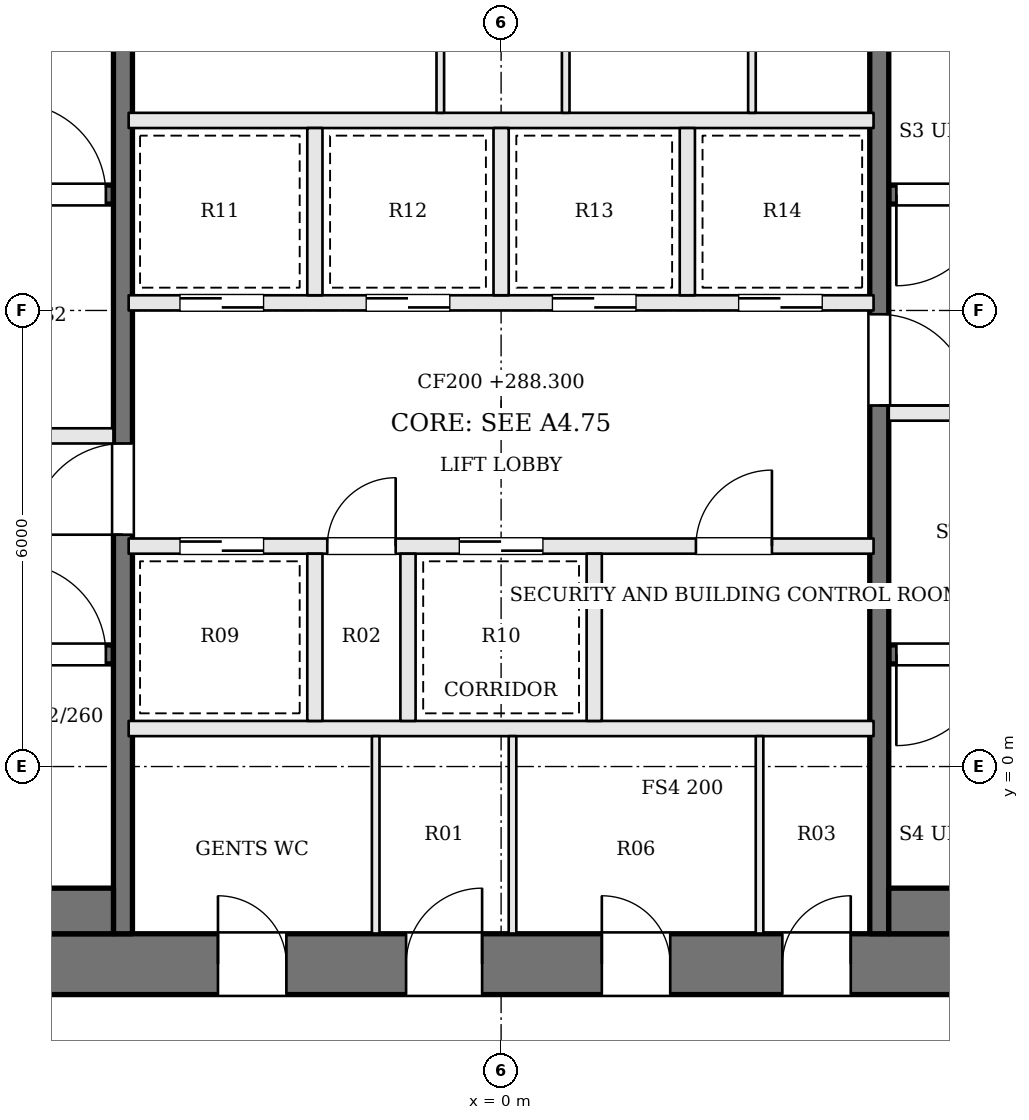
"""IFC4 building model, lengths in metres.
Left out: names, types, materials, properties, quantities, classifications, styles, units other than length and angle.
Written with IfcOpenShell. Run it as: python <this file> out.ifc"""

import sys

from ifc_helpers import new_model, si_unit, direction, frame, frame_2d, origin, place, context, subcontext, project, spatial, rectangle, extrude, element, fill, save


model = new_model("IFC4")
c1 = context("Model", 3, precision=1e-05, world=origin(), true_north=direction((0.0, 1.0)))
c2 = subcontext(c1, "Body", "Model", "MODEL_VIEW")
j1 = project(units=[si_unit("LENGTHUNIT", "METRE"), si_unit("PLANEANGLEUNIT", "RADIAN")], contexts=[c1])
p1 = place(None, origin())
s1 = spatial("IfcSite", under=j1, at=p1, CompositionType="ELEMENT")
p2 = place(p1, origin())
s2 = spatial("IfcBuilding", under=s1, at=p2, CompositionType="ELEMENT")
p3 = place(p2, frame((0.0, 0.0, 288.3)))
s3 = spatial("IfcBuildingStorey", under=s2, at=p3, CompositionType="ELEMENT", Elevation=288.3)
p4 = place(p3, frame((-13.0, -2.6, 0.0), z_axis=(0.0, 0.0, 1.0), x_axis=(1.0, 0.0, 0.0)))
e1 = element("IfcWall", 1, at=p4, inside=s3, PredefinedType="SHEAR", context=c2, shape_type="SweptSolid", body=[
    extrude(rectangle(XDim=26.0, YDim=0.8, at=frame_2d((13.0, 0.0))), origin(), (0.0, 0.0, 1.0), 3.9),
])
p5 = place(p4, frame((9.275, 0.0, 0.0)))
e2 = element("IfcOpeningElement", 2, at=p5, cuts=e1, PredefinedType="OPENING", context=c2, shape_type="SweptSolid", body=[
    extrude(rectangle(XDim=0.9, YDim=2.1, at=frame_2d((0.45, 1.05))), frame((0.0, 0.41, 0.0), z_axis=(0.0, -1.0, 0.0), x_axis=(1.0, 0.0, 0.0)), (0.0, 0.0, 1.0), 0.82),
])
p6 = place(p4, frame((11.75, 0.0, 0.0)))
e3 = element("IfcOpeningElement", 3, at=p6, cuts=e1, PredefinedType="OPENING", context=c2, shape_type="SweptSolid", body=[
    extrude(rectangle(XDim=1.0, YDim=2.1, at=frame_2d((0.5, 1.05))), frame((0.0, 0.41, 0.0), z_axis=(0.0, -1.0, 0.0), x_axis=(1.0, 0.0, 0.0)), (0.0, 0.0, 1.0), 0.82),
])
p7 = place(p4, frame((14.325, 0.0, 0.0)))
e4 = element("IfcOpeningElement", 4, at=p7, cuts=e1, PredefinedType="OPENING", context=c2, shape_type="SweptSolid", body=[
    extrude(rectangle(XDim=0.9, YDim=2.1, at=frame_2d((0.45, 1.05))), frame((0.0, 0.41, 0.0), z_axis=(0.0, -1.0, 0.0), x_axis=(1.0, 0.0, 0.0)), (0.0, 0.0, 1.0), 0.82),
])
p8 = place(p4, frame((16.7, 0.0, 0.0)))
e5 = element("IfcOpeningElement", 5, at=p8, cuts=e1, PredefinedType="OPENING", context=c2, shape_type="SweptSolid", body=[
    extrude(rectangle(XDim=0.9, YDim=2.1, at=frame_2d((0.45, 1.05))), frame((0.0, 0.41, 0.0), z_axis=(0.0, -1.0, 0.0), x_axis=(1.0, 0.0, 0.0)), (0.0, 0.0, 1.0), 0.82),
])
p9 = place(p3, frame((-12.2, 1.475, 0.0), z_axis=(0.0, 0.0, 1.0), x_axis=(1.0, 0.0, 0.0)))
e6 = element("IfcWall", 6, at=p9, inside=s3, PredefinedType="SOLIDWALL", context=c2, shape_type="SweptSolid", body=[
    extrude(rectangle(XDim=7.1, YDim=0.25, at=frame_2d((3.55, 0.0))), origin(), (0.0, 0.0, 1.0), 3.7),
])
p10 = place(p9, frame((5.8, 0.0, 0.0)))
e7 = element("IfcOpeningElement", 7, at=p10, cuts=e6, PredefinedType="OPENING", context=c2, shape_type="SweptSolid", body=[
    extrude(rectangle(XDim=1.2, YDim=2.1, at=frame_2d((0.6, 1.05))), frame((0.0, 0.135, 0.0), z_axis=(0.0, -1.0, 0.0), x_axis=(1.0, 0.0, 0.0)), (0.0, 0.0, 1.0), 0.27),
])
p11 = place(p3, frame((12.2, 7.525, 0.0), z_axis=(0.0, 0.0, 1.0), x_axis=(-1.0, 0.0, 0.0)))
e8 = element("IfcWall", 8, at=p11, inside=s3, PredefinedType="SOLIDWALL", context=c2, shape_type="SweptSolid", body=[
    extrude(rectangle(XDim=7.1, YDim=0.25, at=frame_2d((3.55, 0.0))), origin(), (0.0, 0.0, 1.0), 3.7),
])
p12 = place(p11, frame((5.8, 0.0, 0.0)))
e9 = element("IfcOpeningElement", 9, at=p12, cuts=e8, PredefinedType="OPENING", context=c2, shape_type="SweptSolid", body=[
    extrude(rectangle(XDim=1.2, YDim=2.1, at=frame_2d((0.6, 1.05))), frame((0.0, 0.135, 0.0), z_axis=(0.0, -1.0, 0.0), x_axis=(1.0, 0.0, 0.0)), (0.0, 0.0, 1.0), 0.27),
])
p13 = place(p3, frame((-12.2, 4.35, 0.0), z_axis=(0.0, 0.0, 1.0), x_axis=(1.0, 0.0, 0.0)))
e10 = element("IfcWall", 10, at=p13, inside=s3, PredefinedType="SOLIDWALL", context=c2, shape_type="SweptSolid", body=[
    extrude(rectangle(XDim=7.1, YDim=0.2, at=frame_2d((3.55, 0.0))), origin(), (0.0, 0.0, 1.0), 3.7),
])
p14 = place(p13, frame((4.4, 0.0, 0.0)))
e11 = element("IfcOpeningElement", 11, at=p14, cuts=e10, PredefinedType="OPENING", context=c2, shape_type="SweptSolid", body=[
    extrude(rectangle(XDim=1.2, YDim=2.1, at=frame_2d((0.6, 1.05))), frame((0.0, 0.11, 0.0), z_axis=(0.0, -1.0, 0.0), x_axis=(1.0, 0.0, 0.0)), (0.0, 0.0, 1.0), 0.22),
])
p15 = place(p13, frame((1.1, 0.0, 0.0)))
e12 = element("IfcOpeningElement", 12, at=p15, cuts=e10, PredefinedType="OPENING", context=c2, shape_type="SweptSolid", body=[
    extrude(rectangle(XDim=1.2, YDim=2.1, at=frame_2d((0.6, 1.05))), frame((0.0, 0.11, 0.0), z_axis=(0.0, -1.0, 0.0), x_axis=(1.0, 0.0, 0.0)), (0.0, 0.0, 1.0), 0.22),
])
p16 = place(p3, frame((12.2, 4.65, 0.0), z_axis=(0.0, 0.0, 1.0), x_axis=(-1.0, 0.0, 0.0)))
e13 = element("IfcWall", 13, at=p16, inside=s3, PredefinedType="SOLIDWALL", context=c2, shape_type="SweptSolid", body=[
    extrude(rectangle(XDim=7.1, YDim=0.2, at=frame_2d((3.55, 0.0))), origin(), (0.0, 0.0, 1.0), 3.7),
])
p17 = place(p16, frame((4.4, 0.0, 0.0)))
e14 = element("IfcOpeningElement", 14, at=p17, cuts=e13, PredefinedType="OPENING", context=c2, shape_type="SweptSolid", body=[
    extrude(rectangle(XDim=1.2, YDim=2.1, at=frame_2d((0.6, 1.05))), frame((0.0, 0.11, 0.0), z_axis=(0.0, -1.0, 0.0), x_axis=(1.0, 0.0, 0.0)), (0.0, 0.0, 1.0), 0.22),
])
p18 = place(p16, frame((1.1, 0.0, 0.0)))
e15 = element("IfcOpeningElement", 15, at=p18, cuts=e13, PredefinedType="OPENING", context=c2, shape_type="SweptSolid", body=[
    extrude(rectangle(XDim=1.2, YDim=2.1, at=frame_2d((0.6, 1.05))), frame((0.0, 0.11, 0.0), z_axis=(0.0, -1.0, 0.0), x_axis=(1.0, 0.0, 0.0)), (0.0, 0.0, 1.0), 0.22),
])
p19 = place(p3, frame((-12.2, 7.525, 0.0), z_axis=(0.0, 0.0, 1.0), x_axis=(1.0, 0.0, 0.0)))
e16 = element("IfcWall", 16, at=p19, inside=s3, PredefinedType="SOLIDWALL", context=c2, shape_type="SweptSolid", body=[
    extrude(rectangle(XDim=7.1, YDim=0.25, at=frame_2d((3.55, 0.0))), origin(), (0.0, 0.0, 1.0), 3.7),
])
p20 = place(p19, frame((5.8, 0.0, 0.0)))
e17 = element("IfcOpeningElement", 17, at=p20, cuts=e16, PredefinedType="OPENING", context=c2, shape_type="SweptSolid", body=[
    extrude(rectangle(XDim=1.2, YDim=2.1, at=frame_2d((0.6, 1.05))), frame((0.0, 0.135, 0.0), z_axis=(0.0, -1.0, 0.0), x_axis=(1.0, 0.0, 0.0)), (0.0, 0.0, 1.0), 0.27),
])
p21 = place(p3, frame((12.2, 1.475, 0.0), z_axis=(0.0, 0.0, 1.0), x_axis=(-1.0, 0.0, 0.0)))
e18 = element("IfcWall", 18, at=p21, inside=s3, PredefinedType="SOLIDWALL", context=c2, shape_type="SweptSolid", body=[
    extrude(rectangle(XDim=7.1, YDim=0.25, at=frame_2d((3.55, 0.0))), origin(), (0.0, 0.0, 1.0), 3.7),
])
p22 = place(p21, frame((5.8, 0.0, 0.0)))
e19 = element("IfcOpeningElement", 19, at=p22, cuts=e18, PredefinedType="OPENING", context=c2, shape_type="SweptSolid", body=[
    extrude(rectangle(XDim=1.2, YDim=2.1, at=frame_2d((0.6, 1.05))), frame((0.0, 0.135, 0.0), z_axis=(0.0, -1.0, 0.0), x_axis=(1.0, 0.0, 0.0)), (0.0, 0.0, 1.0), 0.27),
])
p23 = place(p3, frame((-4.975, -2.2, 0.0), z_axis=(0.0, 0.0, 1.0), x_axis=(0.0, 1.0, 0.0)))
e20 = element("IfcWall", 20, at=p23, inside=s3, PredefinedType="SOLIDWALL", context=c2, shape_type="SweptSolid", body=[
    extrude(rectangle(XDim=13.4, YDim=0.25, at=frame_2d((6.7, 0.0))), origin(), (0.0, 0.0, 1.0), 3.7),
])
p24 = place(p23, frame((5.25, 0.0, 0.0)))
e21 = element("IfcOpeningElement", 21, at=p24, cuts=e20, PredefinedType="OPENING", context=c2, shape_type="SweptSolid", body=[
    extrude(rectangle(XDim=1.2, YDim=2.1, at=frame_2d((0.6, 1.05))), frame((0.0, 0.135, 0.0), z_axis=(0.0, -1.0, 0.0), x_axis=(1.0, 0.0, 0.0)), (0.0, 0.0, 1.0), 0.27),
])
p25 = place(p3, frame((4.975, 11.2, 0.0), z_axis=(0.0, 0.0, 1.0), x_axis=(0.0, -1.0, 0.0)))
e22 = element("IfcWall", 22, at=p25, inside=s3, PredefinedType="SOLIDWALL", context=c2, shape_type="SweptSolid", body=[
    extrude(rectangle(XDim=13.4, YDim=0.25, at=frame_2d((6.7, 0.0))), origin(), (0.0, 0.0, 1.0), 3.7),
])
p26 = place(p25, frame((5.25, 0.0, 0.0)))
e23 = element("IfcOpeningElement", 23, at=p26, cuts=e22, PredefinedType="OPENING", context=c2, shape_type="SweptSolid", body=[
    extrude(rectangle(XDim=1.2, YDim=2.1, at=frame_2d((0.6, 1.05))), frame((0.0, 0.135, 0.0), z_axis=(0.0, -1.0, 0.0), x_axis=(1.0, 0.0, 0.0)), (0.0, 0.0, 1.0), 0.27),
])
for number, where, z_axis, x_axis in (
    (24, (-12.2, -1.9, 0.0), (0.0, 0.0, 1.0), (1.0, 0.0, 0.0)),
    (25, (12.2, -1.9, 0.0), (0.0, 0.0, 1.0), (-1.0, 0.0, 0.0)),
):
    element("IfcWall", number, at=place(p3, frame(where, z_axis=z_axis, x_axis=x_axis)), inside=s3, PredefinedType="SOLIDWALL", context=c2, shape_type="SweptSolid", body=[
        extrude(rectangle(XDim=7.1, YDim=0.6, at=frame_2d((3.55, 0.0))), origin(), (0.0, 0.0, 1.0), 3.7),
    ])
p27 = place(p3, frame((-4.9, 0.5, 0.0), z_axis=(0.0, 0.0, 1.0), x_axis=(1.0, 0.0, 0.0)))
e26 = element("IfcWall", 26, at=p27, inside=s3, PredefinedType="SOLIDWALL", context=c2, shape_type="SweptSolid", body=[
    extrude(rectangle(XDim=9.8, YDim=0.2, at=frame_2d((4.9, 0.0))), origin(), (0.0, 0.0, 1.0), 3.7),
])
p28 = place(p3, frame((-4.9, 2.9, 0.0), z_axis=(0.0, 0.0, 1.0), x_axis=(1.0, 0.0, 0.0)))
e27 = element("IfcWall", 27, at=p28, inside=s3, PredefinedType="SOLIDWALL", context=c2, shape_type="SweptSolid", body=[
    extrude(rectangle(XDim=9.8, YDim=0.2, at=frame_2d((4.9, 0.0))), origin(), (0.0, 0.0, 1.0), 3.7),
])
p29 = place(p28, frame((0.675, 0.0, 0.0)))
e28 = element("IfcOpeningElement", 28, at=p29, cuts=e27, PredefinedType="OPENING", context=c2, shape_type="SweptSolid", body=[
    extrude(rectangle(XDim=1.1, YDim=2.1, at=frame_2d((0.55, 1.05))), frame((0.0, 0.11, 0.0), z_axis=(0.0, -1.0, 0.0), x_axis=(1.0, 0.0, 0.0)), (0.0, 0.0, 1.0), 0.22),
])
p30 = place(p28, frame((2.613, 0.0, 0.0)))
e29 = element("IfcOpeningElement", 29, at=p30, cuts=e27, PredefinedType="OPENING", context=c2, shape_type="SweptSolid", body=[
    extrude(rectangle(XDim=0.9, YDim=2.1, at=frame_2d((0.45, 1.05))), frame((0.0, 0.11, 0.0), z_axis=(0.0, -1.0, 0.0), x_axis=(1.0, 0.0, 0.0)), (0.0, 0.0, 1.0), 0.22),
])
p31 = place(p28, frame((4.35, 0.0, 0.0)))
e30 = element("IfcOpeningElement", 30, at=p31, cuts=e27, PredefinedType="OPENING", context=c2, shape_type="SweptSolid", body=[
    extrude(rectangle(XDim=1.1, YDim=2.1, at=frame_2d((0.55, 1.05))), frame((0.0, 0.11, 0.0), z_axis=(0.0, -1.0, 0.0), x_axis=(1.0, 0.0, 0.0)), (0.0, 0.0, 1.0), 0.22),
])
p32 = place(p28, frame((7.463, 0.0, 0.0)))
e31 = element("IfcOpeningElement", 31, at=p32, cuts=e27, PredefinedType="OPENING", context=c2, shape_type="SweptSolid", body=[
    extrude(rectangle(XDim=1.0, YDim=2.1, at=frame_2d((0.5, 1.05))), frame((0.0, 0.11, 0.0), z_axis=(0.0, -1.0, 0.0), x_axis=(1.0, 0.0, 0.0)), (0.0, 0.0, 1.0), 0.22),
])
p33 = place(p3, frame((-4.9, 6.1, 0.0), z_axis=(0.0, 0.0, 1.0), x_axis=(1.0, 0.0, 0.0)))
e32 = element("IfcWall", 32, at=p33, inside=s3, PredefinedType="SOLIDWALL", context=c2, shape_type="SweptSolid", body=[
    extrude(rectangle(XDim=9.8, YDim=0.2, at=frame_2d((4.9, 0.0))), origin(), (0.0, 0.0, 1.0), 3.7),
])
p34 = place(p33, frame((0.675, 0.0, 0.0)))
e33 = element("IfcOpeningElement", 33, at=p34, cuts=e32, PredefinedType="OPENING", context=c2, shape_type="SweptSolid", body=[
    extrude(rectangle(XDim=1.1, YDim=2.1, at=frame_2d((0.55, 1.05))), frame((0.0, 0.11, 0.0), z_axis=(0.0, -1.0, 0.0), x_axis=(1.0, 0.0, 0.0)), (0.0, 0.0, 1.0), 0.22),
])
p35 = place(p33, frame((3.125, 0.0, 0.0)))
e34 = element("IfcOpeningElement", 34, at=p35, cuts=e32, PredefinedType="OPENING", context=c2, shape_type="SweptSolid", body=[
    extrude(rectangle(XDim=1.1, YDim=2.1, at=frame_2d((0.55, 1.05))), frame((0.0, 0.11, 0.0), z_axis=(0.0, -1.0, 0.0), x_axis=(1.0, 0.0, 0.0)), (0.0, 0.0, 1.0), 0.22),
])
p36 = place(p33, frame((5.575, 0.0, 0.0)))
e35 = element("IfcOpeningElement", 35, at=p36, cuts=e32, PredefinedType="OPENING", context=c2, shape_type="SweptSolid", body=[
    extrude(rectangle(XDim=1.1, YDim=2.1, at=frame_2d((0.55, 1.05))), frame((0.0, 0.11, 0.0), z_axis=(0.0, -1.0, 0.0), x_axis=(1.0, 0.0, 0.0)), (0.0, 0.0, 1.0), 0.22),
])
p37 = place(p33, frame((8.025, 0.0, 0.0)))
e36 = element("IfcOpeningElement", 36, at=p37, cuts=e32, PredefinedType="OPENING", context=c2, shape_type="SweptSolid", body=[
    extrude(rectangle(XDim=1.1, YDim=2.1, at=frame_2d((0.55, 1.05))), frame((0.0, 0.11, 0.0), z_axis=(0.0, -1.0, 0.0), x_axis=(1.0, 0.0, 0.0)), (0.0, 0.0, 1.0), 0.22),
])
p38 = place(p3, frame((-4.9, 8.5, 0.0), z_axis=(0.0, 0.0, 1.0), x_axis=(1.0, 0.0, 0.0)))
e37 = element("IfcWall", 37, at=p38, inside=s3, PredefinedType="SOLIDWALL", context=c2, shape_type="SweptSolid", body=[
    extrude(rectangle(XDim=9.8, YDim=0.2, at=frame_2d((4.9, 0.0))), origin(), (0.0, 0.0, 1.0), 3.7),
])
for number, where, z_axis, x_axis in (
    (38, (-2.45, 0.6, 0.0), (0.0, 0.0, 1.0), (0.0, 1.0, 0.0)),
    (39, (-1.225, 0.6, 0.0), (0.0, 0.0, 1.0), (0.0, 1.0, 0.0)),
    (40, (1.225, 0.6, 0.0), (0.0, 0.0, 1.0), (0.0, 1.0, 0.0)),
    (41, (-2.45, 6.2, 0.0), (0.0, 0.0, 1.0), (0.0, 1.0, 0.0)),
    (42, (0.0, 6.2, 0.0), (0.0, 0.0, 1.0), (0.0, 1.0, 0.0)),
    (43, (2.45, 6.2, 0.0), (0.0, 0.0, 1.0), (0.0, 1.0, 0.0)),
):
    element("IfcWall", number, at=place(p3, frame(where, z_axis=z_axis, x_axis=x_axis)), inside=s3, PredefinedType="SOLIDWALL", context=c2, shape_type="SweptSolid", body=[
        extrude(rectangle(XDim=2.2, YDim=0.2, at=frame_2d((1.1, 0.0))), origin(), (0.0, 0.0, 1.0), 3.7),
    ])
for number, where, z_axis, x_axis in (
    (44, (-1.65, -2.2, 0.0), (0.0, 0.0, 1.0), (0.0, 1.0, 0.0)),
    (45, (0.15, -2.2, 0.0), (0.0, 0.0, 1.0), (0.0, 1.0, 0.0)),
    (46, (3.4, -2.2, 0.0), (0.0, 0.0, 1.0), (0.0, 1.0, 0.0)),
    (47, (-0.8, 8.6, 0.0), (0.0, 0.0, 1.0), (0.0, 1.0, 0.0)),
    (48, (0.85, 8.6, 0.0), (0.0, 0.0, 1.0), (0.0, 1.0, 0.0)),
    (49, (3.3, 8.6, 0.0), (0.0, 0.0, 1.0), (0.0, 1.0, 0.0)),
):
    element("IfcWall", number, at=place(p3, frame(where, z_axis=z_axis, x_axis=x_axis)), inside=s3, PredefinedType="PARTITIONING", context=c2, shape_type="SweptSolid", body=[
        extrude(rectangle(XDim=2.6, YDim=0.1, at=frame_2d((1.3, 0.0))), origin(), (0.0, 0.0, 1.0), 3.7),
    ])
p39 = place(p24, origin())
e50 = element("IfcDoor", 50, at=p39, inside=s3, OperationType="SINGLE_SWING_LEFT", PredefinedType="DOOR", context=c2, shape_type="SweptSolid", body=[
    extrude(rectangle(XDim=1.2, YDim=2.1, at=frame_2d((0.6, 1.05))), frame((0.0, 0.025, 0.0), z_axis=(0.0, -1.0, 0.0), x_axis=(1.0, 0.0, 0.0)), (0.0, 0.0, 1.0), 0.05),
])
fill(e21, e50)
p40 = place(p26, origin())
e51 = element("IfcDoor", 51, at=p40, inside=s3, OperationType="SINGLE_SWING_RIGHT", PredefinedType="DOOR", context=c2, shape_type="SweptSolid", body=[
    extrude(rectangle(XDim=1.2, YDim=2.1, at=frame_2d((0.6, 1.05))), frame((0.0, 0.025, 0.0), z_axis=(0.0, -1.0, 0.0), x_axis=(1.0, 0.0, 0.0)), (0.0, 0.0, 1.0), 0.05),
])
fill(e23, e51)
p41 = place(p10, origin())
e52 = element("IfcDoor", 52, at=p41, inside=s3, OperationType="SINGLE_SWING_LEFT", PredefinedType="DOOR", context=c2, shape_type="SweptSolid", body=[
    extrude(rectangle(XDim=1.2, YDim=2.1, at=frame_2d((0.6, 1.05))), frame((0.0, 0.025, 0.0), z_axis=(0.0, -1.0, 0.0), x_axis=(1.0, 0.0, 0.0)), (0.0, 0.0, 1.0), 0.05),
])
fill(e7, e52)
p42 = place(p12, origin())
e53 = element("IfcDoor", 53, at=p42, inside=s3, OperationType="SINGLE_SWING_RIGHT", PredefinedType="DOOR", context=c2, shape_type="SweptSolid", body=[
    extrude(rectangle(XDim=1.2, YDim=2.1, at=frame_2d((0.6, 1.05))), frame((0.0, 0.025, 0.0), z_axis=(0.0, -1.0, 0.0), x_axis=(1.0, 0.0, 0.0)), (0.0, 0.0, 1.0), 0.05),
])
fill(e9, e53)
p43 = place(p20, origin())
e54 = element("IfcDoor", 54, at=p43, inside=s3, OperationType="SINGLE_SWING_LEFT", PredefinedType="DOOR", context=c2, shape_type="SweptSolid", body=[
    extrude(rectangle(XDim=1.2, YDim=2.1, at=frame_2d((0.6, 1.05))), frame((0.0, 0.025, 0.0), z_axis=(0.0, -1.0, 0.0), x_axis=(1.0, 0.0, 0.0)), (0.0, 0.0, 1.0), 0.05),
])
fill(e17, e54)
p44 = place(p22, origin())
e55 = element("IfcDoor", 55, at=p44, inside=s3, OperationType="SINGLE_SWING_RIGHT", PredefinedType="DOOR", context=c2, shape_type="SweptSolid", body=[
    extrude(rectangle(XDim=1.2, YDim=2.1, at=frame_2d((0.6, 1.05))), frame((0.0, 0.025, 0.0), z_axis=(0.0, -1.0, 0.0), x_axis=(1.0, 0.0, 0.0)), (0.0, 0.0, 1.0), 0.05),
])
fill(e19, e55)
p45 = place(p29, origin())
e56 = element("IfcDoor", 56, at=p45, inside=s3, OperationType="SLIDING_TO_RIGHT", PredefinedType="DOOR", context=c2, shape_type="SweptSolid", body=[
    extrude(rectangle(XDim=1.1, YDim=2.1, at=frame_2d((0.55, 1.05))), frame((0.0, 0.025, 0.0), z_axis=(0.0, -1.0, 0.0), x_axis=(1.0, 0.0, 0.0)), (0.0, 0.0, 1.0), 0.05),
])
fill(e28, e56)
p46 = place(p30, origin())
e57 = element("IfcDoor", 57, at=p46, inside=s3, OperationType="SINGLE_SWING_RIGHT", PredefinedType="DOOR", context=c2, shape_type="SweptSolid", body=[
    extrude(rectangle(XDim=0.9, YDim=2.1, at=frame_2d((0.45, 1.05))), frame((0.0, 0.025, 0.0), z_axis=(0.0, -1.0, 0.0), x_axis=(1.0, 0.0, 0.0)), (0.0, 0.0, 1.0), 0.05),
])
fill(e29, e57)
p47 = place(p31, origin())
e58 = element("IfcDoor", 58, at=p47, inside=s3, OperationType="SLIDING_TO_LEFT", PredefinedType="DOOR", context=c2, shape_type="SweptSolid", body=[
    extrude(rectangle(XDim=1.1, YDim=2.1, at=frame_2d((0.55, 1.05))), frame((0.0, 0.025, 0.0), z_axis=(0.0, -1.0, 0.0), x_axis=(1.0, 0.0, 0.0)), (0.0, 0.0, 1.0), 0.05),
])
fill(e30, e58)
p48 = place(p32, origin())
e59 = element("IfcDoor", 59, at=p48, inside=s3, OperationType="SINGLE_SWING_RIGHT", PredefinedType="DOOR", context=c2, shape_type="SweptSolid", body=[
    extrude(rectangle(XDim=1.0, YDim=2.1, at=frame_2d((0.5, 1.05))), frame((0.0, 0.025, 0.0), z_axis=(0.0, -1.0, 0.0), x_axis=(1.0, 0.0, 0.0)), (0.0, 0.0, 1.0), 0.05),
])
fill(e31, e59)
p49 = place(p34, origin())
e60 = element("IfcDoor", 60, at=p49, inside=s3, OperationType="SLIDING_TO_RIGHT", PredefinedType="DOOR", context=c2, shape_type="SweptSolid", body=[
    extrude(rectangle(XDim=1.1, YDim=2.1, at=frame_2d((0.55, 1.05))), frame((0.0, 0.025, 0.0), z_axis=(0.0, -1.0, 0.0), x_axis=(1.0, 0.0, 0.0)), (0.0, 0.0, 1.0), 0.05),
])
fill(e33, e60)
p50 = place(p35, origin())
e61 = element("IfcDoor", 61, at=p50, inside=s3, OperationType="SLIDING_TO_LEFT", PredefinedType="DOOR", context=c2, shape_type="SweptSolid", body=[
    extrude(rectangle(XDim=1.1, YDim=2.1, at=frame_2d((0.55, 1.05))), frame((0.0, 0.025, 0.0), z_axis=(0.0, -1.0, 0.0), x_axis=(1.0, 0.0, 0.0)), (0.0, 0.0, 1.0), 0.05),
])
fill(e34, e61)
p51 = place(p36, origin())
e62 = element("IfcDoor", 62, at=p51, inside=s3, OperationType="SLIDING_TO_RIGHT", PredefinedType="DOOR", context=c2, shape_type="SweptSolid", body=[
    extrude(rectangle(XDim=1.1, YDim=2.1, at=frame_2d((0.55, 1.05))), frame((0.0, 0.025, 0.0), z_axis=(0.0, -1.0, 0.0), x_axis=(1.0, 0.0, 0.0)), (0.0, 0.0, 1.0), 0.05),
])
fill(e35, e62)
p52 = place(p37, origin())
e63 = element("IfcDoor", 63, at=p52, inside=s3, OperationType="SLIDING_TO_LEFT", PredefinedType="DOOR", context=c2, shape_type="SweptSolid", body=[
    extrude(rectangle(XDim=1.1, YDim=2.1, at=frame_2d((0.55, 1.05))), frame((0.0, 0.025, 0.0), z_axis=(0.0, -1.0, 0.0), x_axis=(1.0, 0.0, 0.0)), (0.0, 0.0, 1.0), 0.05),
])
fill(e36, e63)
p53 = place(p5, origin())
e64 = element("IfcDoor", 64, at=p53, inside=s3, OperationType="SINGLE_SWING_LEFT", PredefinedType="DOOR", context=c2, shape_type="SweptSolid", body=[
    extrude(rectangle(XDim=0.9, YDim=2.1, at=frame_2d((0.45, 1.05))), frame((0.0, 0.025, 0.0), z_axis=(0.0, -1.0, 0.0), x_axis=(1.0, 0.0, 0.0)), (0.0, 0.0, 1.0), 0.05),
])
fill(e2, e64)
p54 = place(p6, origin())
e65 = element("IfcDoor", 65, at=p54, inside=s3, OperationType="SINGLE_SWING_RIGHT", PredefinedType="DOOR", context=c2, shape_type="SweptSolid", body=[
    extrude(rectangle(XDim=1.0, YDim=2.1, at=frame_2d((0.5, 1.05))), frame((0.0, 0.025, 0.0), z_axis=(0.0, -1.0, 0.0), x_axis=(1.0, 0.0, 0.0)), (0.0, 0.0, 1.0), 0.05),
])
fill(e3, e65)
p55 = place(p7, origin())
e66 = element("IfcDoor", 66, at=p55, inside=s3, OperationType="SINGLE_SWING_LEFT", PredefinedType="DOOR", context=c2, shape_type="SweptSolid", body=[
    extrude(rectangle(XDim=0.9, YDim=2.1, at=frame_2d((0.45, 1.05))), frame((0.0, 0.025, 0.0), z_axis=(0.0, -1.0, 0.0), x_axis=(1.0, 0.0, 0.0)), (0.0, 0.0, 1.0), 0.05),
])
fill(e4, e66)
p56 = place(p8, origin())
e67 = element("IfcDoor", 67, at=p56, inside=s3, OperationType="SINGLE_SWING_RIGHT", PredefinedType="DOOR", context=c2, shape_type="SweptSolid", body=[
    extrude(rectangle(XDim=0.9, YDim=2.1, at=frame_2d((0.45, 1.05))), frame((0.0, 0.025, 0.0), z_axis=(0.0, -1.0, 0.0), x_axis=(1.0, 0.0, 0.0)), (0.0, 0.0, 1.0), 0.05),
])
fill(e5, e67)
save(model, sys.argv[1])
